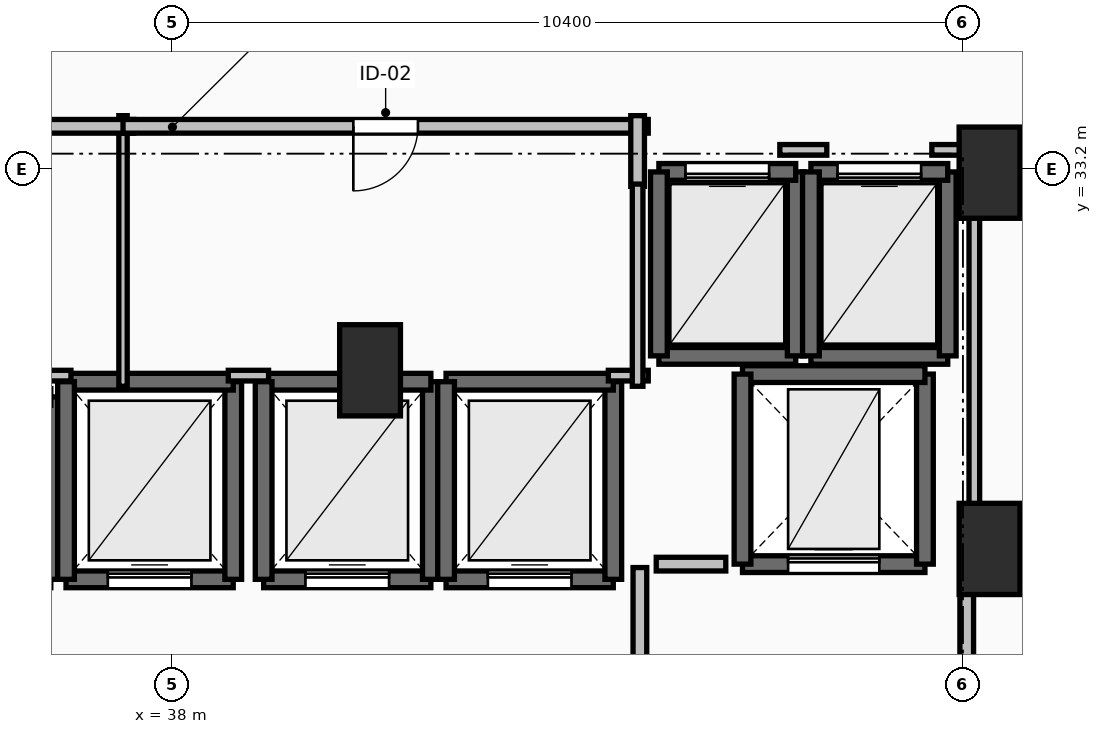
"""IFC4 building model, lengths in metres.
Left out: names, types, materials, properties, quantities, classifications, styles, units other than length and angle.
Written with IfcOpenShell. Run it as: python <this file> out.ifc"""

import sys

from ifc_helpers import new_model, si_unit, direction, frame, frame_2d, origin, origin_2d, place, context, subcontext, project, spatial, rectangle, extrude, element, fill, save


model = new_model("IFC4")
c1 = context("Model", 3, precision=1e-05, world=origin(), true_north=direction((0.0, 1.0)))
c2 = subcontext(c1, "Body", "Model", "MODEL_VIEW")
j1 = project(units=[si_unit("LENGTHUNIT", "METRE"), si_unit("PLANEANGLEUNIT", "RADIAN")], contexts=[c1])
p1 = place(None, origin())
s1 = spatial("IfcSite", under=j1, at=p1, CompositionType="ELEMENT")
p2 = place(p1, origin())
s2 = spatial("IfcBuilding", under=s1, at=p2, CompositionType="ELEMENT")
p3 = place(p2, origin())
s3 = spatial("IfcBuildingStorey", under=s2, at=p3, CompositionType="ELEMENT", Elevation=0.0)
for number, where, z_axis, x_axis in (
    (1, (48.75, 33.15, 0.0), (0.0, 0.0, 1.0), (1.0, 0.0, 0.0)),
    (2, (48.75, 28.2, 0.0), (0.0, 0.0, 1.0), (1.0, 0.0, 0.0)),
    (3, (40.6, 30.55, 0.0), (0.0, 0.0, 1.0), (1.0, 0.0, 0.0)),
):
    element("IfcColumn", number, at=place(p3, frame(where, z_axis=z_axis, x_axis=x_axis)), inside=s3, PredefinedType="PILASTER", context=c2, shape_type="SweptSolid", body=[
        extrude(rectangle(XDim=0.8, YDim=1.2, at=origin_2d()), origin(), (0.0, 0.0, 1.0), 4.8),
    ])
p4 = place(p3, frame((36.4, 27.8, 0.0), z_axis=(0.0, 0.0, 1.0), x_axis=(0.0, 1.0, 0.0)))
e4 = element("IfcWall", 4, at=p4, inside=s3, PredefinedType="SOLIDWALL", context=c2, shape_type="SweptSolid", body=[
    extrude(rectangle(XDim=2.4, YDim=0.22, at=frame_2d((1.2, 0.0))), origin(), (0.0, 0.0, 1.0), 4.48),
])
p5 = place(p3, frame((36.6, 27.8, 0.0), z_axis=(0.0, 0.0, 1.0), x_axis=(1.0, 0.0, 0.0)))
e5 = element("IfcWall", 5, at=p5, inside=s3, PredefinedType="SOLIDWALL", context=c2, shape_type="SweptSolid", body=[
    extrude(rectangle(XDim=2.2, YDim=0.22, at=frame_2d((1.1, 0.0))), origin(), (0.0, 0.0, 1.0), 4.48),
])
p6 = place(p5, frame((0.55, 0.0, 0.0)))
e6 = element("IfcOpeningElement", 6, at=p6, cuts=e5, PredefinedType="OPENING", context=c2, shape_type="SweptSolid", body=[
    extrude(rectangle(XDim=1.1, YDim=2.2, at=frame_2d((0.55, 1.1))), frame((0.0, 0.125, 0.0), z_axis=(0.0, -1.0, 0.0), x_axis=(1.0, 0.0, 0.0)), (0.0, 0.0, 1.0), 0.25),
])
p7 = place(p3, frame((38.8, 27.8, 0.0), z_axis=(0.0, 0.0, 1.0), x_axis=(0.0, 1.0, 0.0)))
e7 = element("IfcWall", 7, at=p7, inside=s3, PredefinedType="SOLIDWALL", context=c2, shape_type="SweptSolid", body=[
    extrude(rectangle(XDim=2.6, YDim=0.22, at=frame_2d((1.3, 0.0))), origin(), (0.0, 0.0, 1.0), 4.48),
])
p8 = place(p3, frame((38.8, 30.4, 0.0), z_axis=(0.0, 0.0, 1.0), x_axis=(-1.0, 0.0, 0.0)))
e8 = element("IfcWall", 8, at=p8, inside=s3, PredefinedType="SOLIDWALL", context=c2, shape_type="SweptSolid", body=[
    extrude(rectangle(XDim=2.2, YDim=0.22, at=frame_2d((1.1, 0.0))), origin(), (0.0, 0.0, 1.0), 4.48),
])
p9 = place(p3, frame((36.6, 30.4, 0.0), z_axis=(0.0, 0.0, 1.0), x_axis=(0.0, -1.0, 0.0)))
e9 = element("IfcWall", 9, at=p9, inside=s3, PredefinedType="SOLIDWALL", context=c2, shape_type="SweptSolid", body=[
    extrude(rectangle(XDim=2.6, YDim=0.22, at=frame_2d((1.3, 0.0))), origin(), (0.0, 0.0, 1.0), 4.48),
])
p10 = place(p3, frame((39.2, 27.8, 0.0), z_axis=(0.0, 0.0, 1.0), x_axis=(1.0, 0.0, 0.0)))
e10 = element("IfcWall", 10, at=p10, inside=s3, PredefinedType="SOLIDWALL", context=c2, shape_type="SweptSolid", body=[
    extrude(rectangle(XDim=2.2, YDim=0.22, at=frame_2d((1.1, 0.0))), origin(), (0.0, 0.0, 1.0), 4.48),
])
p11 = place(p10, frame((0.55, 0.0, 0.0)))
e11 = element("IfcOpeningElement", 11, at=p11, cuts=e10, PredefinedType="OPENING", context=c2, shape_type="SweptSolid", body=[
    extrude(rectangle(XDim=1.1, YDim=2.2, at=frame_2d((0.55, 1.1))), frame((0.0, 0.125, 0.0), z_axis=(0.0, -1.0, 0.0), x_axis=(1.0, 0.0, 0.0)), (0.0, 0.0, 1.0), 0.25),
])
p12 = place(p3, frame((41.4, 27.8, 0.0), z_axis=(0.0, 0.0, 1.0), x_axis=(0.0, 1.0, 0.0)))
e12 = element("IfcWall", 12, at=p12, inside=s3, PredefinedType="SOLIDWALL", context=c2, shape_type="SweptSolid", body=[
    extrude(rectangle(XDim=2.6, YDim=0.22, at=frame_2d((1.3, 0.0))), origin(), (0.0, 0.0, 1.0), 4.48),
])
p13 = place(p3, frame((41.4, 30.4, 0.0), z_axis=(0.0, 0.0, 1.0), x_axis=(-1.0, 0.0, 0.0)))
e13 = element("IfcWall", 13, at=p13, inside=s3, PredefinedType="SOLIDWALL", context=c2, shape_type="SweptSolid", body=[
    extrude(rectangle(XDim=2.2, YDim=0.22, at=frame_2d((1.1, 0.0))), origin(), (0.0, 0.0, 1.0), 4.48),
])
p14 = place(p3, frame((39.2, 30.4, 0.0), z_axis=(0.0, 0.0, 1.0), x_axis=(0.0, -1.0, 0.0)))
e14 = element("IfcWall", 14, at=p14, inside=s3, PredefinedType="SOLIDWALL", context=c2, shape_type="SweptSolid", body=[
    extrude(rectangle(XDim=2.6, YDim=0.22, at=frame_2d((1.3, 0.0))), origin(), (0.0, 0.0, 1.0), 4.48),
])
p15 = place(p3, frame((41.6, 27.8, 0.0), z_axis=(0.0, 0.0, 1.0), x_axis=(1.0, 0.0, 0.0)))
e15 = element("IfcWall", 15, at=p15, inside=s3, PredefinedType="SOLIDWALL", context=c2, shape_type="SweptSolid", body=[
    extrude(rectangle(XDim=2.2, YDim=0.22, at=frame_2d((1.1, 0.0))), origin(), (0.0, 0.0, 1.0), 4.48),
])
p16 = place(p15, frame((0.55, 0.0, 0.0)))
e16 = element("IfcOpeningElement", 16, at=p16, cuts=e15, PredefinedType="OPENING", context=c2, shape_type="SweptSolid", body=[
    extrude(rectangle(XDim=1.1, YDim=2.2, at=frame_2d((0.55, 1.1))), frame((0.0, 0.125, 0.0), z_axis=(0.0, -1.0, 0.0), x_axis=(1.0, 0.0, 0.0)), (0.0, 0.0, 1.0), 0.25),
])
p17 = place(p3, frame((43.8, 27.8, 0.0), z_axis=(0.0, 0.0, 1.0), x_axis=(0.0, 1.0, 0.0)))
e17 = element("IfcWall", 17, at=p17, inside=s3, PredefinedType="SOLIDWALL", context=c2, shape_type="SweptSolid", body=[
    extrude(rectangle(XDim=2.6, YDim=0.22, at=frame_2d((1.3, 0.0))), origin(), (0.0, 0.0, 1.0), 4.48),
])
p18 = place(p3, frame((43.8, 30.4, 0.0), z_axis=(0.0, 0.0, 1.0), x_axis=(-1.0, 0.0, 0.0)))
e18 = element("IfcWall", 18, at=p18, inside=s3, PredefinedType="SOLIDWALL", context=c2, shape_type="SweptSolid", body=[
    extrude(rectangle(XDim=2.2, YDim=0.22, at=frame_2d((1.1, 0.0))), origin(), (0.0, 0.0, 1.0), 4.48),
])
p19 = place(p3, frame((41.6, 30.4, 0.0), z_axis=(0.0, 0.0, 1.0), x_axis=(0.0, -1.0, 0.0)))
e19 = element("IfcWall", 19, at=p19, inside=s3, PredefinedType="SOLIDWALL", context=c2, shape_type="SweptSolid", body=[
    extrude(rectangle(XDim=2.6, YDim=0.22, at=frame_2d((1.3, 0.0))), origin(), (0.0, 0.0, 1.0), 4.48),
])
p20 = place(p3, frame((44.4, 30.74, 0.0), z_axis=(0.0, 0.0, 1.0), x_axis=(1.0, 0.0, 0.0)))
e20 = element("IfcWall", 20, at=p20, inside=s3, PredefinedType="SOLIDWALL", context=c2, shape_type="SweptSolid", body=[
    extrude(rectangle(XDim=1.8, YDim=0.22, at=frame_2d((0.9, 0.0))), origin(), (0.0, 0.0, 1.0), 4.48),
])
p21 = place(p3, frame((46.2, 30.74, 0.0), z_axis=(0.0, 0.0, 1.0), x_axis=(0.0, 1.0, 0.0)))
e21 = element("IfcWall", 21, at=p21, inside=s3, PredefinedType="SOLIDWALL", context=c2, shape_type="SweptSolid", body=[
    extrude(rectangle(XDim=2.42, YDim=0.22, at=frame_2d((1.21, 0.0))), origin(), (0.0, 0.0, 1.0), 4.48),
])
p22 = place(p3, frame((46.2, 33.16, 0.0), z_axis=(0.0, 0.0, 1.0), x_axis=(-1.0, 0.0, 0.0)))
e22 = element("IfcWall", 22, at=p22, inside=s3, PredefinedType="SOLIDWALL", context=c2, shape_type="SweptSolid", body=[
    extrude(rectangle(XDim=1.8, YDim=0.22, at=frame_2d((0.9, 0.0))), origin(), (0.0, 0.0, 1.0), 4.48),
])
p23 = place(p22, frame((0.35, 0.0, 0.0)))
e23 = element("IfcOpeningElement", 23, at=p23, cuts=e22, PredefinedType="OPENING", context=c2, shape_type="SweptSolid", body=[
    extrude(rectangle(XDim=1.1, YDim=2.2, at=frame_2d((0.55, 1.1))), frame((0.0, 0.125, 0.0), z_axis=(0.0, -1.0, 0.0), x_axis=(1.0, 0.0, 0.0)), (0.0, 0.0, 1.0), 0.25),
])
p24 = place(p3, frame((44.4, 33.16, 0.0), z_axis=(0.0, 0.0, 1.0), x_axis=(0.0, -1.0, 0.0)))
e24 = element("IfcWall", 24, at=p24, inside=s3, PredefinedType="SOLIDWALL", context=c2, shape_type="SweptSolid", body=[
    extrude(rectangle(XDim=2.42, YDim=0.22, at=frame_2d((1.21, 0.0))), origin(), (0.0, 0.0, 1.0), 4.48),
])
p25 = place(p3, frame((46.4, 30.74, 0.0), z_axis=(0.0, 0.0, 1.0), x_axis=(1.0, 0.0, 0.0)))
e25 = element("IfcWall", 25, at=p25, inside=s3, PredefinedType="SOLIDWALL", context=c2, shape_type="SweptSolid", body=[
    extrude(rectangle(XDim=1.8, YDim=0.22, at=frame_2d((0.9, 0.0))), origin(), (0.0, 0.0, 1.0), 4.48),
])
p26 = place(p3, frame((48.2, 30.74, 0.0), z_axis=(0.0, 0.0, 1.0), x_axis=(0.0, 1.0, 0.0)))
e26 = element("IfcWall", 26, at=p26, inside=s3, PredefinedType="SOLIDWALL", context=c2, shape_type="SweptSolid", body=[
    extrude(rectangle(XDim=2.42, YDim=0.22, at=frame_2d((1.21, 0.0))), origin(), (0.0, 0.0, 1.0), 4.48),
])
p27 = place(p3, frame((48.2, 33.16, 0.0), z_axis=(0.0, 0.0, 1.0), x_axis=(-1.0, 0.0, 0.0)))
e27 = element("IfcWall", 27, at=p27, inside=s3, PredefinedType="SOLIDWALL", context=c2, shape_type="SweptSolid", body=[
    extrude(rectangle(XDim=1.8, YDim=0.22, at=frame_2d((0.9, 0.0))), origin(), (0.0, 0.0, 1.0), 4.48),
])
p28 = place(p27, frame((0.35, 0.0, 0.0)))
e28 = element("IfcOpeningElement", 28, at=p28, cuts=e27, PredefinedType="OPENING", context=c2, shape_type="SweptSolid", body=[
    extrude(rectangle(XDim=1.1, YDim=2.2, at=frame_2d((0.55, 1.1))), frame((0.0, 0.125, 0.0), z_axis=(0.0, -1.0, 0.0), x_axis=(1.0, 0.0, 0.0)), (0.0, 0.0, 1.0), 0.25),
])
p29 = place(p3, frame((46.4, 33.16, 0.0), z_axis=(0.0, 0.0, 1.0), x_axis=(0.0, -1.0, 0.0)))
e29 = element("IfcWall", 29, at=p29, inside=s3, PredefinedType="SOLIDWALL", context=c2, shape_type="SweptSolid", body=[
    extrude(rectangle(XDim=2.42, YDim=0.22, at=frame_2d((1.21, 0.0))), origin(), (0.0, 0.0, 1.0), 4.48),
])
p30 = place(p3, frame((45.5, 28.0, 0.0), z_axis=(0.0, 0.0, 1.0), x_axis=(1.0, 0.0, 0.0)))
e30 = element("IfcWall", 30, at=p30, inside=s3, PredefinedType="SHEAR", context=c2, shape_type="SweptSolid", body=[
    extrude(rectangle(XDim=2.4, YDim=0.22, at=frame_2d((1.2, 0.0))), origin(), (0.0, 0.0, 1.0), 4.48),
])
p31 = place(p30, frame((0.6, 0.0, 0.0)))
e31 = element("IfcOpeningElement", 31, at=p31, cuts=e30, PredefinedType="OPENING", context=c2, shape_type="SweptSolid", body=[
    extrude(rectangle(XDim=1.2, YDim=2.2, at=frame_2d((0.6, 1.1))), frame((0.0, 0.125, 0.0), z_axis=(0.0, -1.0, 0.0), x_axis=(1.0, 0.0, 0.0)), (0.0, 0.0, 1.0), 0.25),
])
p32 = place(p3, frame((47.9, 28.0, 0.0), z_axis=(0.0, 0.0, 1.0), x_axis=(0.0, 1.0, 0.0)))
e32 = element("IfcWall", 32, at=p32, inside=s3, PredefinedType="SHEAR", context=c2, shape_type="SweptSolid", body=[
    extrude(rectangle(XDim=2.5, YDim=0.22, at=frame_2d((1.25, 0.0))), origin(), (0.0, 0.0, 1.0), 4.48),
])
p33 = place(p3, frame((47.9, 30.5, 0.0), z_axis=(0.0, 0.0, 1.0), x_axis=(-1.0, 0.0, 0.0)))
e33 = element("IfcWall", 33, at=p33, inside=s3, PredefinedType="SHEAR", context=c2, shape_type="SweptSolid", body=[
    extrude(rectangle(XDim=2.4, YDim=0.22, at=frame_2d((1.2, 0.0))), origin(), (0.0, 0.0, 1.0), 4.48),
])
p34 = place(p3, frame((45.5, 30.5, 0.0), z_axis=(0.0, 0.0, 1.0), x_axis=(0.0, -1.0, 0.0)))
e34 = element("IfcWall", 34, at=p34, inside=s3, PredefinedType="SHEAR", context=c2, shape_type="SweptSolid", body=[
    extrude(rectangle(XDim=2.5, YDim=0.22, at=frame_2d((1.25, 0.0))), origin(), (0.0, 0.0, 1.0), 4.48),
])
p35 = place(p3, frame((44.15, 27.955, 0.0), z_axis=(0.0, 0.0, 1.0), x_axis=(0.0, -1.0, 0.0)))
e35 = element("IfcWall", 35, at=p35, inside=s3, PredefinedType="PARTITIONING", context=c2, shape_type="SweptSolid", body=[
    extrude(rectangle(XDim=3.91, YDim=0.18, at=frame_2d((1.955, 0.0))), origin(), (0.0, 0.0, 1.0), 4.48),
])
p36 = place(p35, frame((1.355, 0.0, 0.0)))
e36 = element("IfcOpeningElement", 36, at=p36, cuts=e35, PredefinedType="OPENING", context=c2, shape_type="SweptSolid", body=[
    extrude(rectangle(XDim=1.2, YDim=2.15, at=frame_2d((0.6, 1.075))), frame((0.0, 0.105, 0.0), z_axis=(0.0, -1.0, 0.0), x_axis=(1.0, 0.0, 0.0)), (0.0, 0.0, 1.0), 0.21),
])
p37 = place(p3, frame((48.45, 23.95, 0.0), z_axis=(0.0, 0.0, 1.0), x_axis=(0.0, 1.0, 0.0)))
e37 = element("IfcWall", 37, at=p37, inside=s3, PredefinedType="PARTITIONING", context=c2, shape_type="SweptSolid", body=[
    extrude(rectangle(XDim=4.05, YDim=0.18, at=frame_2d((2.025, 0.0))), origin(), (0.0, 0.0, 1.0), 4.48),
])
p38 = place(p37, frame((1.425, 0.0, 0.0)))
e38 = element("IfcOpeningElement", 38, at=p38, cuts=e37, PredefinedType="OPENING", context=c2, shape_type="SweptSolid", body=[
    extrude(rectangle(XDim=1.2, YDim=2.15, at=frame_2d((0.6, 1.075))), frame((0.0, 0.105, 0.0), z_axis=(0.0, -1.0, 0.0), x_axis=(1.0, 0.0, 0.0)), (0.0, 0.0, 1.0), 0.21),
])
p39 = place(p3, frame((37.35, 30.34, 0.0), z_axis=(0.0, 0.0, 1.0), x_axis=(0.0, 1.0, 0.0)))
e39 = element("IfcWall", 39, at=p39, inside=s3, PredefinedType="PARTITIONING", context=c2, shape_type="SweptSolid", body=[
    extrude(rectangle(XDim=3.56, YDim=0.11, at=frame_2d((1.78, 0.0))), origin(), (0.0, 0.0, 1.0), 3.672),
])
p40 = place(p3, frame((37.49, 33.76, 0.0), z_axis=(0.0, 0.0, 1.0), x_axis=(-1.0, 0.0, 0.0)))
e40 = element("IfcWall", 40, at=p40, inside=s3, PredefinedType="PARTITIONING", context=c2, shape_type="SweptSolid", body=[
    extrude(rectangle(XDim=4.13, YDim=0.18, at=frame_2d((2.065, 0.0))), origin(), (0.0, 0.0, 1.0), 4.48),
])
p41 = place(p40, frame((1.64, 0.0, 0.0)))
e41 = element("IfcOpeningElement", 41, at=p41, cuts=e40, PredefinedType="OPENING", context=c2, shape_type="SweptSolid", body=[
    extrude(rectangle(XDim=0.85, YDim=2.1, at=frame_2d((0.425, 1.05))), frame((0.0, 0.105, 0.0), z_axis=(0.0, -1.0, 0.0), x_axis=(1.0, 0.0, 0.0)), (0.0, 0.0, 1.0), 0.21),
])
p42 = place(p3, frame((44.26, 33.76, 0.0), z_axis=(0.0, 0.0, 1.0), x_axis=(-1.0, 0.0, 0.0)))
e42 = element("IfcWall", 42, at=p42, inside=s3, PredefinedType="PARTITIONING", context=c2, shape_type="SweptSolid", body=[
    extrude(rectangle(XDim=6.91, YDim=0.18, at=frame_2d((3.455, 0.0))), origin(), (0.0, 0.0, 1.0), 4.48),
])
p43 = place(p42, frame((3.03, 0.0, 0.0)))
e43 = element("IfcOpeningElement", 43, at=p43, cuts=e42, PredefinedType="OPENING", context=c2, shape_type="SweptSolid", body=[
    extrude(rectangle(XDim=0.85, YDim=2.1, at=frame_2d((0.425, 1.05))), frame((0.0, 0.105, 0.0), z_axis=(0.0, -1.0, 0.0), x_axis=(1.0, 0.0, 0.0)), (0.0, 0.0, 1.0), 0.21),
])
p44 = place(p3, frame((44.12, 32.97, 0.0), z_axis=(0.0, 0.0, 1.0), x_axis=(0.0, 1.0, 0.0)))
e44 = element("IfcWall", 44, at=p44, inside=s3, PredefinedType="PARTITIONING", context=c2, shape_type="SweptSolid", body=[
    extrude(rectangle(XDim=0.93, YDim=0.18, at=frame_2d((0.465, 0.0))), origin(), (0.0, 0.0, 1.0), 4.48),
])
p45 = place(p3, frame((45.28, 28.0, 0.0), z_axis=(0.0, 0.0, 1.0), x_axis=(-1.0, 0.0, 0.0)))
e45 = element("IfcWall", 45, at=p45, inside=s3, PredefinedType="PARTITIONING", context=c2, shape_type="SweptSolid", body=[
    extrude(rectangle(XDim=0.915, YDim=0.18, at=frame_2d((0.458, 0.0))), origin(), (0.0, 0.0, 1.0), 4.48),
])
p46 = place(p3, frame((33.44, 30.48, 0.0), z_axis=(0.0, 0.0, 1.0), x_axis=(1.0, 0.0, 0.0)))
e46 = element("IfcWall", 46, at=p46, inside=s3, PredefinedType="PARTITIONING", context=c2, shape_type="SweptSolid", body=[
    extrude(rectangle(XDim=3.225, YDim=0.14, at=frame_2d((1.613, 0.0))), origin(), (0.0, 0.0, 1.0), 3.672),
])
p47 = place(p3, frame((38.735, 30.48, 0.0), z_axis=(0.0, 0.0, 1.0), x_axis=(1.0, 0.0, 0.0)))
e47 = element("IfcWall", 47, at=p47, inside=s3, PredefinedType="PARTITIONING", context=c2, shape_type="SweptSolid", body=[
    extrude(rectangle(XDim=0.53, YDim=0.14, at=frame_2d((0.265, 0.0))), origin(), (0.0, 0.0, 1.0), 3.672),
])
p48 = place(p3, frame((43.735, 30.48, 0.0), z_axis=(0.0, 0.0, 1.0), x_axis=(1.0, 0.0, 0.0)))
e48 = element("IfcWall", 48, at=p48, inside=s3, PredefinedType="PARTITIONING", context=c2, shape_type="SweptSolid", body=[
    extrude(rectangle(XDim=0.525, YDim=0.14, at=frame_2d((0.262, 0.0))), origin(), (0.0, 0.0, 1.0), 4.48),
])
p49 = place(p3, frame((44.12, 30.34, 0.0), z_axis=(0.0, 0.0, 1.0), x_axis=(0.0, 1.0, 0.0)))
e49 = element("IfcWall", 49, at=p49, inside=s3, PredefinedType="PARTITIONING", context=c2, shape_type="SweptSolid", body=[
    extrude(rectangle(XDim=2.66, YDim=0.14, at=frame_2d((1.33, 0.0))), origin(), (0.0, 0.0, 1.0), 4.48),
])
p50 = place(p3, frame((45.991, 33.45, 0.0), z_axis=(0.0, 0.0, 1.0), x_axis=(1.0, 0.0, 0.0)))
e50 = element("IfcWall", 50, at=p50, inside=s3, PredefinedType="PARTITIONING", context=c2, shape_type="SweptSolid", body=[
    extrude(rectangle(XDim=0.618, YDim=0.14, at=frame_2d((0.309, 0.0))), origin(), (0.0, 0.0, 1.0), 4.48),
])
p51 = place(p3, frame((47.991, 33.45, 0.0), z_axis=(0.0, 0.0, 1.0), x_axis=(1.0, 0.0, 0.0)))
e51 = element("IfcWall", 51, at=p51, inside=s3, PredefinedType="PARTITIONING", context=c2, shape_type="SweptSolid", body=[
    extrude(rectangle(XDim=0.559, YDim=0.14, at=frame_2d((0.28, 0.0))), origin(), (0.0, 0.0, 1.0), 3.672),
])
p52 = place(p3, frame((48.55, 33.45, 0.0), z_axis=(0.0, 0.0, 1.0), x_axis=(0.0, -1.0, 0.0)))
e52 = element("IfcWall", 52, at=p52, inside=s3, PredefinedType="PARTITIONING", context=c2, shape_type="SweptSolid", body=[
    extrude(rectangle(XDim=5.254, YDim=0.14, at=frame_2d((2.627, 0.0))), origin(), (0.0, 0.0, 1.0), 3.672),
])
p53 = place(p6, origin())
e53 = element("IfcDoor", 53, at=p53, inside=s3, OperationType="SLIDING_TO_LEFT", PredefinedType="DOOR", context=c2, shape_type="SweptSolid", body=[
    extrude(rectangle(XDim=1.1, YDim=2.2, at=frame_2d((0.55, 1.1))), frame((0.0, 0.025, 0.0), z_axis=(0.0, -1.0, 0.0), x_axis=(1.0, 0.0, 0.0)), (0.0, 0.0, 1.0), 0.05),
])
fill(e6, e53)
p54 = place(p11, origin())
e54 = element("IfcDoor", 54, at=p54, inside=s3, OperationType="SLIDING_TO_LEFT", PredefinedType="DOOR", context=c2, shape_type="SweptSolid", body=[
    extrude(rectangle(XDim=1.1, YDim=2.2, at=frame_2d((0.55, 1.1))), frame((0.0, 0.025, 0.0), z_axis=(0.0, -1.0, 0.0), x_axis=(1.0, 0.0, 0.0)), (0.0, 0.0, 1.0), 0.05),
])
fill(e11, e54)
p55 = place(p16, origin())
e55 = element("IfcDoor", 55, at=p55, inside=s3, OperationType="SLIDING_TO_LEFT", PredefinedType="DOOR", context=c2, shape_type="SweptSolid", body=[
    extrude(rectangle(XDim=1.1, YDim=2.2, at=frame_2d((0.55, 1.1))), frame((0.0, 0.025, 0.0), z_axis=(0.0, -1.0, 0.0), x_axis=(1.0, 0.0, 0.0)), (0.0, 0.0, 1.0), 0.05),
])
fill(e16, e55)
p56 = place(p23, origin())
e56 = element("IfcDoor", 56, at=p56, inside=s3, OperationType="SLIDING_TO_LEFT", PredefinedType="DOOR", context=c2, shape_type="SweptSolid", body=[
    extrude(rectangle(XDim=1.1, YDim=2.2, at=frame_2d((0.55, 1.1))), frame((0.0, 0.025, 0.0), z_axis=(0.0, -1.0, 0.0), x_axis=(1.0, 0.0, 0.0)), (0.0, 0.0, 1.0), 0.05),
])
fill(e23, e56)
p57 = place(p28, origin())
e57 = element("IfcDoor", 57, at=p57, inside=s3, OperationType="SLIDING_TO_LEFT", PredefinedType="DOOR", context=c2, shape_type="SweptSolid", body=[
    extrude(rectangle(XDim=1.1, YDim=2.2, at=frame_2d((0.55, 1.1))), frame((0.0, 0.025, 0.0), z_axis=(0.0, -1.0, 0.0), x_axis=(1.0, 0.0, 0.0)), (0.0, 0.0, 1.0), 0.05),
])
fill(e28, e57)
p58 = place(p31, origin())
e58 = element("IfcDoor", 58, at=p58, inside=s3, OperationType="SLIDING_TO_LEFT", PredefinedType="DOOR", context=c2, shape_type="SweptSolid", body=[
    extrude(rectangle(XDim=1.2, YDim=2.2, at=frame_2d((0.6, 1.1))), frame((0.0, 0.025, 0.0), z_axis=(0.0, -1.0, 0.0), x_axis=(1.0, 0.0, 0.0)), (0.0, 0.0, 1.0), 0.05),
])
fill(e31, e58)
p59 = place(p43, origin())
e59 = element("IfcDoor", 59, at=p59, inside=s3, OperationType="SINGLE_SWING_RIGHT", PredefinedType="DOOR", context=c2, shape_type="SweptSolid", body=[
    extrude(rectangle(XDim=0.85, YDim=2.1, at=frame_2d((0.425, 1.05))), frame((0.0, 0.025, 0.0), z_axis=(0.0, -1.0, 0.0), x_axis=(1.0, 0.0, 0.0)), (0.0, 0.0, 1.0), 0.05),
])
fill(e43, e59)
save(model, sys.argv[1])
